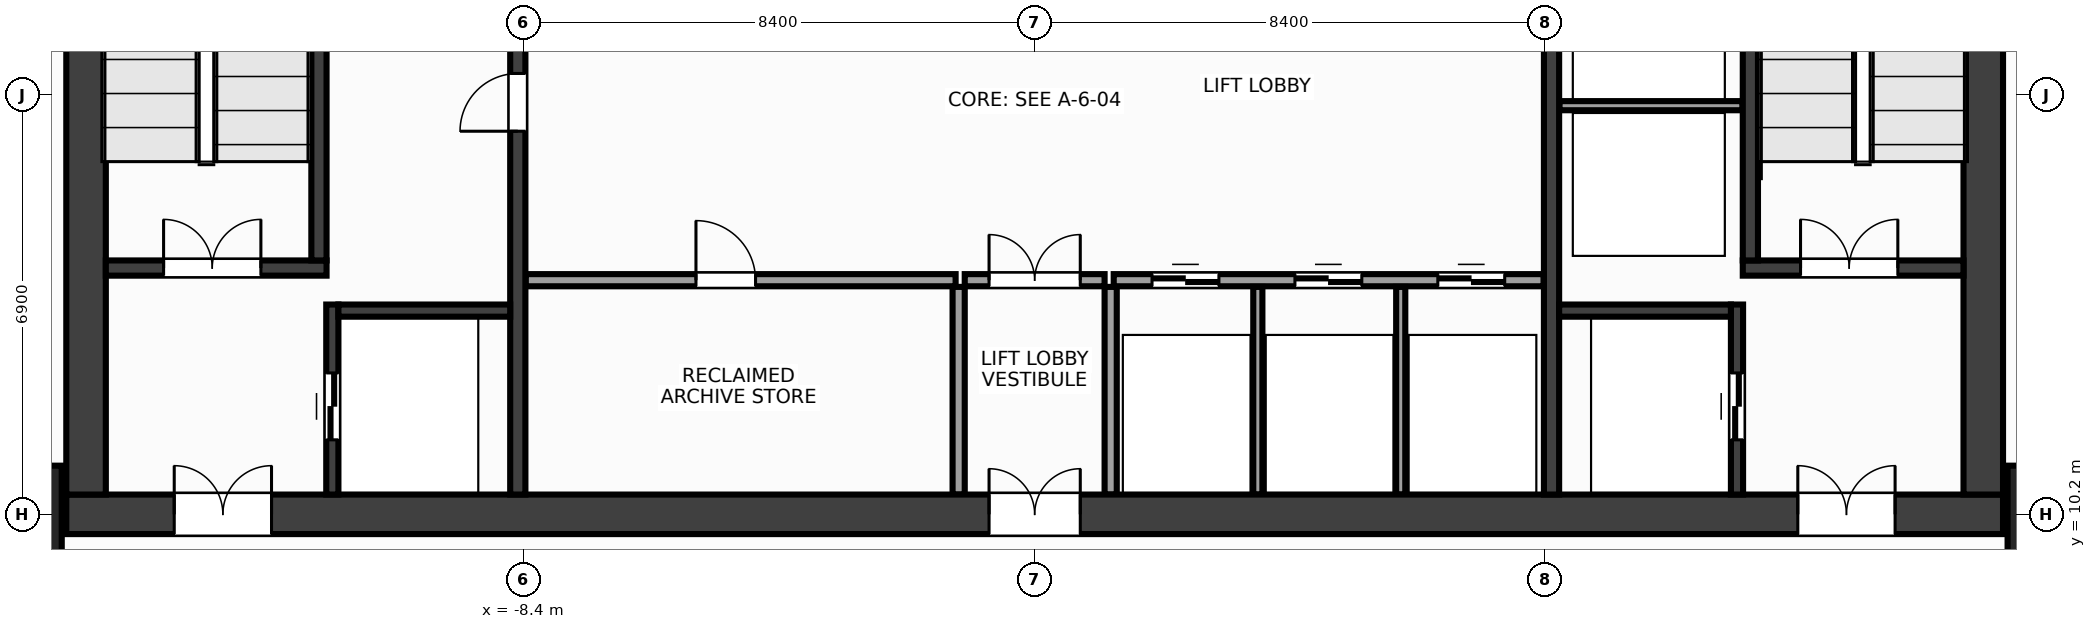
"""IFC4 building model, lengths in metres.
Left out: names, types, materials, properties, quantities, classifications, styles, units other than length and angle.
Written with IfcOpenShell. Run it as: python <this file> out.ifc"""

import sys

from ifc_helpers import new_model, si_unit, direction, frame, frame_2d, origin, origin_2d, place, context, subcontext, project, spatial, rectangle, extrude, source, transform, mapped, element, fill, save


model = new_model("IFC4")
c1 = context("Model", 3, precision=1e-05, world=origin(), true_north=direction((0.0, 1.0)))
c2 = subcontext(c1, "Body", "Model", "MODEL_VIEW")
j1 = project(units=[si_unit("LENGTHUNIT", "METRE"), si_unit("PLANEANGLEUNIT", "RADIAN")], contexts=[c1])
p1 = place(None, origin())
s1 = spatial("IfcSite", under=j1, at=p1, CompositionType="ELEMENT")
p2 = place(p1, origin())
s2 = spatial("IfcBuilding", under=s1, at=p2, CompositionType="ELEMENT")
p3 = place(p2, frame((0.0, 0.0, 84.8)))
s3 = spatial("IfcBuildingStorey", under=s2, at=p3, CompositionType="ELEMENT", Elevation=84.8)
m1 = source(origin(), c2, "Body", "SweptSolid", [
    extrude(rectangle(XDim=31.85, YDim=0.65, at=frame_2d((15.925, 0.0))), origin(), (0.0, 0.0, 1.0), 3.6),
])
p4 = place(p3, frame((-15.925, 10.2, 0.0), z_axis=(0.0, 0.0, 1.0), x_axis=(1.0, 0.0, 0.0)))
e1 = element("IfcWall", 1, at=p4, inside=s3, PredefinedType="SHEAR", context=c2, shape_type="MappedRepresentation", body=[
    mapped(m1, transform((0.0, 0.0, 0.0), x_axis=(1.0, 0.0, 0.0), y_axis=(0.0, 1.0, 0.0), z_axis=(0.0, 0.0, 1.0), scale=1.0)),
])
p5 = place(p4, frame((1.775, 0.0, 0.0)))
e2 = element("IfcOpeningElement", 2, at=p5, cuts=e1, PredefinedType="OPENING", context=c2, shape_type="SweptSolid", body=[
    extrude(rectangle(XDim=1.6, YDim=2.15, at=frame_2d((0.8, 1.075))), frame((0.0, 0.337, 0.0), z_axis=(0.0, -1.0, 0.0), x_axis=(1.0, 0.0, 0.0)), (0.0, 0.0, 1.0), 0.674),
])
p6 = place(p4, frame((28.475, 0.0, 0.0)))
e3 = element("IfcOpeningElement", 3, at=p6, cuts=e1, PredefinedType="OPENING", context=c2, shape_type="SweptSolid", body=[
    extrude(rectangle(XDim=1.6, YDim=2.15, at=frame_2d((0.8, 1.075))), frame((0.0, 0.337, 0.0), z_axis=(0.0, -1.0, 0.0), x_axis=(1.0, 0.0, 0.0)), (0.0, 0.0, 1.0), 0.674),
])
p7 = place(p4, frame((15.175, 0.0, 0.0)))
e4 = element("IfcOpeningElement", 4, at=p7, cuts=e1, PredefinedType="OPENING", context=c2, shape_type="SweptSolid", body=[
    extrude(rectangle(XDim=1.5, YDim=2.2, at=frame_2d((0.75, 1.1))), frame((0.0, 0.337, 0.0), z_axis=(0.0, -1.0, 0.0), x_axis=(1.0, 0.0, 0.0)), (0.0, 0.0, 1.0), 0.674),
])
m2 = source(origin(), c2, "Body", "SweptSolid", [
    extrude(rectangle(XDim=12.95, YDim=0.65, at=frame_2d((6.475, 0.0))), origin(), (0.0, 0.0, 1.0), 3.6),
])
for number, where, z_axis, x_axis in (
    (5, (-15.6, 10.525, 0.0), (0.0, 0.0, 1.0), (0.0, 1.0, 0.0)),
    (6, (15.6, 10.525, 0.0), (0.0, 0.0, 1.0), (0.0, 1.0, 0.0)),
):
    element("IfcWall", number, at=place(p3, frame(where, z_axis=z_axis, x_axis=x_axis)), inside=s3, PredefinedType="SHEAR", context=c2, shape_type="MappedRepresentation", body=[
        mapped(m2, transform((0.0, 0.0, 0.0), x_axis=(1.0, 0.0, 0.0), y_axis=(0.0, 1.0, 0.0), z_axis=(0.0, 0.0, 1.0), scale=1.0)),
    ])
m3 = source(origin(), c2, "Body", "SweptSolid", [
    extrude(rectangle(XDim=12.95, YDim=0.25, at=frame_2d((6.475, 0.0))), origin(), (0.0, 0.0, 1.0), 3.6),
])
p8 = place(p3, frame((-8.5, 10.525, 0.0), z_axis=(0.0, 0.0, 1.0), x_axis=(0.0, 1.0, 0.0)))
e7 = element("IfcWall", 7, at=p8, inside=s3, PredefinedType="SHEAR", context=c2, shape_type="MappedRepresentation", body=[
    mapped(m3, transform((0.0, 0.0, 0.0), x_axis=(1.0, 0.0, 0.0), y_axis=(0.0, 1.0, 0.0), z_axis=(0.0, 0.0, 1.0), scale=1.0)),
])
p9 = place(p8, frame((5.975, 0.0, 0.0)))
e8 = element("IfcOpeningElement", 8, at=p9, cuts=e7, PredefinedType="OPENING", context=c2, shape_type="SweptSolid", body=[
    extrude(rectangle(XDim=0.95, YDim=2.15, at=frame_2d((0.475, 1.075))), frame((0.0, 0.137, 0.0), z_axis=(0.0, -1.0, 0.0), x_axis=(1.0, 0.0, 0.0)), (0.0, 0.0, 1.0), 0.274),
])
p10 = place(p3, frame((8.5, 10.525, 0.0), z_axis=(0.0, 0.0, 1.0), x_axis=(0.0, 1.0, 0.0)))
e9 = element("IfcWall", 9, at=p10, inside=s3, PredefinedType="SHEAR", context=c2, shape_type="MappedRepresentation", body=[
    mapped(m3, transform((0.0, 0.0, 0.0), x_axis=(1.0, 0.0, 0.0), y_axis=(0.0, 1.0, 0.0), z_axis=(0.0, 0.0, 1.0), scale=1.0)),
])
p11 = place(p10, frame((9.925, 0.0, 0.0)))
e10 = element("IfcOpeningElement", 10, at=p11, cuts=e9, PredefinedType="OPENING", context=c2, shape_type="SweptSolid", body=[
    extrude(rectangle(XDim=0.95, YDim=2.15, at=frame_2d((0.475, 1.075))), frame((0.0, 0.137, 0.0), z_axis=(0.0, -1.0, 0.0), x_axis=(1.0, 0.0, 0.0)), (0.0, 0.0, 1.0), 0.274),
])
m4 = source(origin(), c2, "Body", "SweptSolid", [
    extrude(rectangle(XDim=3.63, YDim=0.25, at=frame_2d((1.815, 0.0))), origin(), (0.0, 0.0, 1.0), 3.6),
])
p12 = place(p3, frame((-15.275, 14.25, 0.0), z_axis=(0.0, 0.0, 1.0), x_axis=(1.0, 0.0, 0.0)))
e11 = element("IfcWall", 11, at=p12, inside=s3, PredefinedType="SHEAR", context=c2, shape_type="MappedRepresentation", body=[
    mapped(m4, transform((0.0, 0.0, 0.0), x_axis=(1.0, 0.0, 0.0), y_axis=(0.0, 1.0, 0.0), z_axis=(0.0, 0.0, 1.0), scale=1.0)),
])
p13 = place(p12, frame((0.95, 0.0, 0.0)))
e12 = element("IfcOpeningElement", 12, at=p13, cuts=e11, PredefinedType="OPENING", context=c2, shape_type="SweptSolid", body=[
    extrude(rectangle(XDim=1.6, YDim=2.15, at=frame_2d((0.8, 1.075))), frame((0.0, 0.137, 0.0), z_axis=(0.0, -1.0, 0.0), x_axis=(1.0, 0.0, 0.0)), (0.0, 0.0, 1.0), 0.274),
])
m5 = source(origin(), c2, "Body", "SweptSolid", [
    extrude(rectangle(XDim=9.1, YDim=0.25, at=frame_2d((4.55, 0.0))), origin(), (0.0, 0.0, 1.0), 3.6),
])
p14 = place(p3, frame((-11.77, 14.375, 0.0), z_axis=(0.0, 0.0, 1.0), x_axis=(0.0, 1.0, 0.0)))
e13 = element("IfcWall", 13, at=p14, inside=s3, PredefinedType="SHEAR", context=c2, shape_type="MappedRepresentation", body=[
    mapped(m5, transform((0.0, 0.0, 0.0), x_axis=(1.0, 0.0, 0.0), y_axis=(0.0, 1.0, 0.0), z_axis=(0.0, 0.0, 1.0), scale=1.0)),
])
p15 = place(p3, frame((11.645, 14.25, 0.0), z_axis=(0.0, 0.0, 1.0), x_axis=(1.0, 0.0, 0.0)))
e14 = element("IfcWall", 14, at=p15, inside=s3, PredefinedType="SHEAR", context=c2, shape_type="MappedRepresentation", body=[
    mapped(m4, transform((0.0, 0.0, 0.0), x_axis=(1.0, 0.0, 0.0), y_axis=(0.0, 1.0, 0.0), z_axis=(0.0, 0.0, 1.0), scale=1.0)),
])
p16 = place(p15, frame((0.95, 0.0, 0.0)))
e15 = element("IfcOpeningElement", 15, at=p16, cuts=e14, PredefinedType="OPENING", context=c2, shape_type="SweptSolid", body=[
    extrude(rectangle(XDim=1.6, YDim=2.15, at=frame_2d((0.8, 1.075))), frame((0.0, 0.137, 0.0), z_axis=(0.0, -1.0, 0.0), x_axis=(1.0, 0.0, 0.0)), (0.0, 0.0, 1.0), 0.274),
])
p17 = place(p3, frame((11.77, 14.375, 0.0), z_axis=(0.0, 0.0, 1.0), x_axis=(0.0, 1.0, 0.0)))
e16 = element("IfcWall", 16, at=p17, inside=s3, PredefinedType="SHEAR", context=c2, shape_type="MappedRepresentation", body=[
    mapped(m5, transform((0.0, 0.0, 0.0), x_axis=(1.0, 0.0, 0.0), y_axis=(0.0, 1.0, 0.0), z_axis=(0.0, 0.0, 1.0), scale=1.0)),
])
m6 = source(origin(), c2, "Body", "SweptSolid", [
    extrude(rectangle(XDim=3.125, YDim=0.2, at=frame_2d((1.562, 0.0))), origin(), (0.0, 0.0, 1.0), 3.6),
])
p18 = place(p3, frame((-11.55, 10.525, 0.0), z_axis=(0.0, 0.0, 1.0), x_axis=(0.0, 1.0, 0.0)))
e17 = element("IfcWall", 17, at=p18, inside=s3, PredefinedType="SHEAR", context=c2, shape_type="MappedRepresentation", body=[
    mapped(m6, transform((0.0, 0.0, 0.0), x_axis=(1.0, 0.0, 0.0), y_axis=(0.0, 1.0, 0.0), z_axis=(0.0, 0.0, 1.0), scale=1.0)),
])
p19 = place(p18, frame((0.9, 0.0, 0.0)))
e18 = element("IfcOpeningElement", 18, at=p19, cuts=e17, PredefinedType="OPENING", context=c2, shape_type="SweptSolid", body=[
    extrude(rectangle(XDim=1.1, YDim=2.15, at=frame_2d((0.55, 1.075))), frame((0.0, 0.112, 0.0), z_axis=(0.0, -1.0, 0.0), x_axis=(1.0, 0.0, 0.0)), (0.0, 0.0, 1.0), 0.224),
])
m7 = source(origin(), c2, "Body", "SweptSolid", [
    extrude(rectangle(XDim=2.825, YDim=0.2, at=frame_2d((1.413, 0.0))), origin(), (0.0, 0.0, 1.0), 3.6),
])
p20 = place(p3, frame((-11.45, 13.55, 0.0), z_axis=(0.0, 0.0, 1.0), x_axis=(1.0, 0.0, 0.0)))
e19 = element("IfcWall", 19, at=p20, inside=s3, PredefinedType="SHEAR", context=c2, shape_type="MappedRepresentation", body=[
    mapped(m7, transform((0.0, 0.0, 0.0), x_axis=(1.0, 0.0, 0.0), y_axis=(0.0, 1.0, 0.0), z_axis=(0.0, 0.0, 1.0), scale=1.0)),
])
p21 = place(p3, frame((11.55, 10.525, 0.0), z_axis=(0.0, 0.0, 1.0), x_axis=(0.0, 1.0, 0.0)))
e20 = element("IfcWall", 20, at=p21, inside=s3, PredefinedType="SHEAR", context=c2, shape_type="MappedRepresentation", body=[
    mapped(m6, transform((0.0, 0.0, 0.0), x_axis=(1.0, 0.0, 0.0), y_axis=(0.0, 1.0, 0.0), z_axis=(0.0, 0.0, 1.0), scale=1.0)),
])
p22 = place(p21, frame((0.9, 0.0, 0.0)))
e21 = element("IfcOpeningElement", 21, at=p22, cuts=e20, PredefinedType="OPENING", context=c2, shape_type="SweptSolid", body=[
    extrude(rectangle(XDim=1.1, YDim=2.15, at=frame_2d((0.55, 1.075))), frame((0.0, 0.112, 0.0), z_axis=(0.0, -1.0, 0.0), x_axis=(1.0, 0.0, 0.0)), (0.0, 0.0, 1.0), 0.224),
])
p23 = place(p3, frame((8.625, 13.55, 0.0), z_axis=(0.0, 0.0, 1.0), x_axis=(1.0, 0.0, 0.0)))
e22 = element("IfcWall", 22, at=p23, inside=s3, PredefinedType="SHEAR", context=c2, shape_type="MappedRepresentation", body=[
    mapped(m7, transform((0.0, 0.0, 0.0), x_axis=(1.0, 0.0, 0.0), y_axis=(0.0, 1.0, 0.0), z_axis=(0.0, 0.0, 1.0), scale=1.0)),
])
m8 = source(origin(), c2, "Body", "SweptSolid", [
    extrude(rectangle(XDim=1.6, YDim=1.6, at=origin_2d()), origin(), (0.0, 0.0, 1.0), 3.6),
])
for number, where, z_axis, x_axis in (
    (23, (-16.8, 10.2, 0.0), (0.0, 0.0, 1.0), (1.0, 0.0, 0.0)),
    (24, (16.8, 10.2, 0.0), (0.0, 0.0, 1.0), (1.0, 0.0, 0.0)),
):
    element("IfcColumn", number, at=place(p3, frame(where, z_axis=z_axis, x_axis=x_axis)), inside=s3, PredefinedType="COLUMN", context=c2, shape_type="MappedRepresentation", body=[
        mapped(m8, transform((0.0, 0.0, 0.0), x_axis=(1.0, 0.0, 0.0), y_axis=(0.0, 1.0, 0.0), z_axis=(0.0, 0.0, 1.0), scale=1.0)),
    ])
m9 = source(origin(), c2, "Body", "SweptSolid", [
    extrude(rectangle(XDim=3.01, YDim=0.15, at=frame_2d((1.505, 0.0))), origin(), (0.0, 0.0, 1.0), 3.36),
])
p24 = place(p3, frame((8.63, 16.92, 0.0), z_axis=(0.0, 0.0, 1.0), x_axis=(1.0, 0.0, 0.0)))
e25 = element("IfcWall", 25, at=p24, inside=s3, PredefinedType="PARTITIONING", context=c2, shape_type="MappedRepresentation", body=[
    mapped(m9, transform((0.0, 0.0, 0.0), x_axis=(1.0, 0.0, 0.0), y_axis=(0.0, 1.0, 0.0), z_axis=(0.0, 0.0, 1.0), scale=1.0)),
])
m10 = source(origin(), c2, "Body", "SweptSolid", [
    extrude(rectangle(XDim=7.07, YDim=0.2, at=frame_2d((3.535, 0.0))), origin(), (0.0, 0.0, 1.0), 3.36),
])
p25 = place(p3, frame((-8.37, 14.05, 0.0), z_axis=(0.0, 0.0, 1.0), x_axis=(1.0, 0.0, 0.0)))
e26 = element("IfcWall", 26, at=p25, inside=s3, PredefinedType="PARTITIONING", context=c2, shape_type="MappedRepresentation", body=[
    mapped(m10, transform((0.0, 0.0, 0.0), x_axis=(1.0, 0.0, 0.0), y_axis=(0.0, 1.0, 0.0), z_axis=(0.0, 0.0, 1.0), scale=1.0)),
])
p26 = place(p25, frame((2.8, 0.0, 0.0)))
e27 = element("IfcOpeningElement", 27, at=p26, cuts=e26, PredefinedType="OPENING", context=c2, shape_type="SweptSolid", body=[
    extrude(rectangle(XDim=0.98, YDim=2.15, at=frame_2d((0.49, 1.075))), frame((0.0, 0.112, 0.0), z_axis=(0.0, -1.0, 0.0), x_axis=(1.0, 0.0, 0.0)), (0.0, 0.0, 1.0), 0.224),
])
p27 = place(p3, frame((1.3, 14.05, 0.0), z_axis=(0.0, 0.0, 1.0), x_axis=(1.0, 0.0, 0.0)))
e28 = element("IfcWall", 28, at=p27, inside=s3, PredefinedType="PARTITIONING", context=c2, shape_type="MappedRepresentation", body=[
    mapped(m10, transform((0.0, 0.0, 0.0), x_axis=(1.0, 0.0, 0.0), y_axis=(0.0, 1.0, 0.0), z_axis=(0.0, 0.0, 1.0), scale=1.0)),
])
p28 = place(p27, frame((0.63, 0.0, 0.0)))
e29 = element("IfcOpeningElement", 29, at=p28, cuts=e28, PredefinedType="OPENING", context=c2, shape_type="SweptSolid", body=[
    extrude(rectangle(XDim=1.1, YDim=2.15, at=frame_2d((0.55, 1.075))), frame((0.0, 0.112, 0.0), z_axis=(0.0, -1.0, 0.0), x_axis=(1.0, 0.0, 0.0)), (0.0, 0.0, 1.0), 0.224),
])
p29 = place(p27, frame((2.98, 0.0, 0.0)))
e30 = element("IfcOpeningElement", 30, at=p29, cuts=e28, PredefinedType="OPENING", context=c2, shape_type="SweptSolid", body=[
    extrude(rectangle(XDim=1.1, YDim=2.15, at=frame_2d((0.55, 1.075))), frame((0.0, 0.112, 0.0), z_axis=(0.0, -1.0, 0.0), x_axis=(1.0, 0.0, 0.0)), (0.0, 0.0, 1.0), 0.224),
])
p30 = place(p27, frame((5.33, 0.0, 0.0)))
e31 = element("IfcOpeningElement", 31, at=p30, cuts=e28, PredefinedType="OPENING", context=c2, shape_type="SweptSolid", body=[
    extrude(rectangle(XDim=1.1, YDim=2.15, at=frame_2d((0.55, 1.075))), frame((0.0, 0.112, 0.0), z_axis=(0.0, -1.0, 0.0), x_axis=(1.0, 0.0, 0.0)), (0.0, 0.0, 1.0), 0.224),
])
m11 = source(origin(), c2, "Body", "SweptSolid", [
    extrude(rectangle(XDim=3.415, YDim=0.2, at=frame_2d((1.708, 0.0))), origin(), (0.0, 0.0, 1.0), 3.36),
])
for number, where, z_axis, x_axis in (
    (32, (-1.25, 10.525, 0.0), (0.0, 0.0, 1.0), (0.0, 1.0, 0.0)),
    (33, (1.25, 10.525, 0.0), (0.0, 0.0, 1.0), (0.0, 1.0, 0.0)),
):
    element("IfcWall", number, at=place(p3, frame(where, z_axis=z_axis, x_axis=x_axis)), inside=s3, PredefinedType="PARTITIONING", context=c2, shape_type="MappedRepresentation", body=[
        mapped(m11, transform((0.0, 0.0, 0.0), x_axis=(1.0, 0.0, 0.0), y_axis=(0.0, 1.0, 0.0), z_axis=(0.0, 0.0, 1.0), scale=1.0)),
    ])
m12 = source(origin(), c2, "Body", "SweptSolid", [
    extrude(rectangle(XDim=2.3, YDim=0.2, at=frame_2d((1.15, 0.0))), origin(), (0.0, 0.0, 1.0), 3.36),
])
p31 = place(p3, frame((-1.15, 14.05, 0.0), z_axis=(0.0, 0.0, 1.0), x_axis=(1.0, 0.0, 0.0)))
e34 = element("IfcWall", 34, at=p31, inside=s3, PredefinedType="PARTITIONING", context=c2, shape_type="MappedRepresentation", body=[
    mapped(m12, transform((0.0, 0.0, 0.0), x_axis=(1.0, 0.0, 0.0), y_axis=(0.0, 1.0, 0.0), z_axis=(0.0, 0.0, 1.0), scale=1.0)),
])
p32 = place(p31, frame((0.4, 0.0, 0.0)))
e35 = element("IfcOpeningElement", 35, at=p32, cuts=e34, PredefinedType="OPENING", context=c2, shape_type="SweptSolid", body=[
    extrude(rectangle(XDim=1.5, YDim=2.2, at=frame_2d((0.75, 1.1))), frame((0.0, 0.112, 0.0), z_axis=(0.0, -1.0, 0.0), x_axis=(1.0, 0.0, 0.0)), (0.0, 0.0, 1.0), 0.224),
])
m13 = source(origin(), c2, "Body", "SweptSolid", [
    extrude(rectangle(XDim=3.415, YDim=0.15, at=frame_2d((1.708, 0.0))), origin(), (0.0, 0.0, 1.0), 3.36),
])
for number, where, z_axis, x_axis in (
    (36, (3.67, 10.525, 0.0), (0.0, 0.0, 1.0), (0.0, 1.0, 0.0)),
    (37, (6.02, 10.525, 0.0), (0.0, 0.0, 1.0), (0.0, 1.0, 0.0)),
):
    element("IfcWall", number, at=place(p3, frame(where, z_axis=z_axis, x_axis=x_axis)), inside=s3, PredefinedType="PARTITIONING", context=c2, shape_type="MappedRepresentation", body=[
        mapped(m13, transform((0.0, 0.0, 0.0), x_axis=(1.0, 0.0, 0.0), y_axis=(0.0, 1.0, 0.0), z_axis=(0.0, 0.0, 1.0), scale=1.0)),
    ])
m14 = source(origin(), c2, "Body", "SweptSolid", [
    extrude(rectangle(XDim=1.6, YDim=2.15, at=frame_2d((0.8, 1.075))), frame((0.0, 0.025, 0.0), z_axis=(0.0, -1.0, 0.0), x_axis=(1.0, 0.0, 0.0)), (0.0, 0.0, 1.0), 0.05),
])
p33 = place(p13, origin())
e38 = element("IfcDoor", 38, at=p33, inside=s3, OperationType="DOUBLE_DOOR_SINGLE_SWING", PredefinedType="DOOR", context=c2, shape_type="MappedRepresentation", body=[
    mapped(m14, transform((0.0, 0.0, 0.0), x_axis=(1.0, 0.0, 0.0), y_axis=(0.0, 1.0, 0.0), z_axis=(0.0, 0.0, 1.0), scale=1.0)),
])
fill(e12, e38)
p34 = place(p16, origin())
e39 = element("IfcDoor", 39, at=p34, inside=s3, OperationType="DOUBLE_DOOR_SINGLE_SWING", PredefinedType="DOOR", context=c2, shape_type="MappedRepresentation", body=[
    mapped(m14, transform((0.0, 0.0, 0.0), x_axis=(1.0, 0.0, 0.0), y_axis=(0.0, 1.0, 0.0), z_axis=(0.0, 0.0, 1.0), scale=1.0)),
])
fill(e15, e39)
p35 = place(p5, origin())
e40 = element("IfcDoor", 40, at=p35, inside=s3, OperationType="DOUBLE_DOOR_SINGLE_SWING", PredefinedType="DOOR", context=c2, shape_type="MappedRepresentation", body=[
    mapped(m14, transform((0.0, 0.0, 0.0), x_axis=(1.0, 0.0, 0.0), y_axis=(0.0, 1.0, 0.0), z_axis=(0.0, 0.0, 1.0), scale=1.0)),
])
fill(e2, e40)
p36 = place(p6, origin())
e41 = element("IfcDoor", 41, at=p36, inside=s3, OperationType="DOUBLE_DOOR_SINGLE_SWING", PredefinedType="DOOR", context=c2, shape_type="MappedRepresentation", body=[
    mapped(m14, transform((0.0, 0.0, 0.0), x_axis=(1.0, 0.0, 0.0), y_axis=(0.0, 1.0, 0.0), z_axis=(0.0, 0.0, 1.0), scale=1.0)),
])
fill(e3, e41)
m15 = source(origin(), c2, "Body", "SweptSolid", [
    extrude(rectangle(XDim=1.1, YDim=2.15, at=frame_2d((0.55, 1.075))), frame((0.0, 0.025, 0.0), z_axis=(0.0, -1.0, 0.0), x_axis=(1.0, 0.0, 0.0)), (0.0, 0.0, 1.0), 0.05),
])
p37 = place(p19, origin())
e42 = element("IfcDoor", 42, at=p37, inside=s3, OperationType="DOUBLE_DOOR_SLIDING", PredefinedType="DOOR", context=c2, shape_type="MappedRepresentation", body=[
    mapped(m15, transform((0.0, 0.0, 0.0), x_axis=(1.0, 0.0, 0.0), y_axis=(0.0, 1.0, 0.0), z_axis=(0.0, 0.0, 1.0), scale=1.0)),
])
fill(e18, e42)
p38 = place(p22, origin())
e43 = element("IfcDoor", 43, at=p38, inside=s3, OperationType="DOUBLE_DOOR_SLIDING", PredefinedType="DOOR", context=c2, shape_type="MappedRepresentation", body=[
    mapped(m15, transform((0.0, 0.0, 0.0), x_axis=(1.0, 0.0, 0.0), y_axis=(0.0, 1.0, 0.0), z_axis=(0.0, 0.0, 1.0), scale=1.0)),
])
fill(e21, e43)
m16 = source(origin(), c2, "Body", "SweptSolid", [
    extrude(rectangle(XDim=0.95, YDim=2.15, at=frame_2d((0.475, 1.075))), frame((0.0, 0.025, 0.0), z_axis=(0.0, -1.0, 0.0), x_axis=(1.0, 0.0, 0.0)), (0.0, 0.0, 1.0), 0.05),
])
p39 = place(p9, origin())
e44 = element("IfcDoor", 44, at=p39, inside=s3, OperationType="SINGLE_SWING_LEFT", PredefinedType="DOOR", context=c2, shape_type="MappedRepresentation", body=[
    mapped(m16, transform((0.0, 0.0, 0.0), x_axis=(1.0, 0.0, 0.0), y_axis=(0.0, 1.0, 0.0), z_axis=(0.0, 0.0, 1.0), scale=1.0)),
])
fill(e8, e44)
m17 = source(origin(), c2, "Body", "SweptSolid", [
    extrude(rectangle(XDim=0.98, YDim=2.15, at=frame_2d((0.49, 1.075))), frame((0.0, 0.025, 0.0), z_axis=(0.0, -1.0, 0.0), x_axis=(1.0, 0.0, 0.0)), (0.0, 0.0, 1.0), 0.05),
])
p40 = place(p26, origin())
e45 = element("IfcDoor", 45, at=p40, inside=s3, OperationType="SINGLE_SWING_LEFT", PredefinedType="DOOR", context=c2, shape_type="MappedRepresentation", body=[
    mapped(m17, transform((0.0, 0.0, 0.0), x_axis=(1.0, 0.0, 0.0), y_axis=(0.0, 1.0, 0.0), z_axis=(0.0, 0.0, 1.0), scale=1.0)),
])
fill(e27, e45)
p41 = place(p28, origin())
e46 = element("IfcDoor", 46, at=p41, inside=s3, OperationType="DOUBLE_DOOR_SLIDING", PredefinedType="DOOR", context=c2, shape_type="MappedRepresentation", body=[
    mapped(m15, transform((0.0, 0.0, 0.0), x_axis=(1.0, 0.0, 0.0), y_axis=(0.0, 1.0, 0.0), z_axis=(0.0, 0.0, 1.0), scale=1.0)),
])
fill(e29, e46)
p42 = place(p29, origin())
e47 = element("IfcDoor", 47, at=p42, inside=s3, OperationType="DOUBLE_DOOR_SLIDING", PredefinedType="DOOR", context=c2, shape_type="MappedRepresentation", body=[
    mapped(m15, transform((0.0, 0.0, 0.0), x_axis=(1.0, 0.0, 0.0), y_axis=(0.0, 1.0, 0.0), z_axis=(0.0, 0.0, 1.0), scale=1.0)),
])
fill(e30, e47)
p43 = place(p30, origin())
e48 = element("IfcDoor", 48, at=p43, inside=s3, OperationType="DOUBLE_DOOR_SLIDING", PredefinedType="DOOR", context=c2, shape_type="MappedRepresentation", body=[
    mapped(m15, transform((0.0, 0.0, 0.0), x_axis=(1.0, 0.0, 0.0), y_axis=(0.0, 1.0, 0.0), z_axis=(0.0, 0.0, 1.0), scale=1.0)),
])
fill(e31, e48)
m18 = source(origin(), c2, "Body", "SweptSolid", [
    extrude(rectangle(XDim=1.5, YDim=2.2, at=frame_2d((0.75, 1.1))), frame((0.0, 0.025, 0.0), z_axis=(0.0, -1.0, 0.0), x_axis=(1.0, 0.0, 0.0)), (0.0, 0.0, 1.0), 0.05),
])
p44 = place(p32, origin())
e49 = element("IfcDoor", 49, at=p44, inside=s3, OperationType="DOUBLE_DOOR_SINGLE_SWING", PredefinedType="DOOR", context=c2, shape_type="MappedRepresentation", body=[
    mapped(m18, transform((0.0, 0.0, 0.0), x_axis=(1.0, 0.0, 0.0), y_axis=(0.0, 1.0, 0.0), z_axis=(0.0, 0.0, 1.0), scale=1.0)),
])
fill(e35, e49)
p45 = place(p7, origin())
e50 = element("IfcDoor", 50, at=p45, inside=s3, OperationType="DOUBLE_DOOR_SINGLE_SWING", PredefinedType="DOOR", context=c2, shape_type="MappedRepresentation", body=[
    mapped(m18, transform((0.0, 0.0, 0.0), x_axis=(1.0, 0.0, 0.0), y_axis=(0.0, 1.0, 0.0), z_axis=(0.0, 0.0, 1.0), scale=1.0)),
])
fill(e4, e50)
save(model, sys.argv[1])
